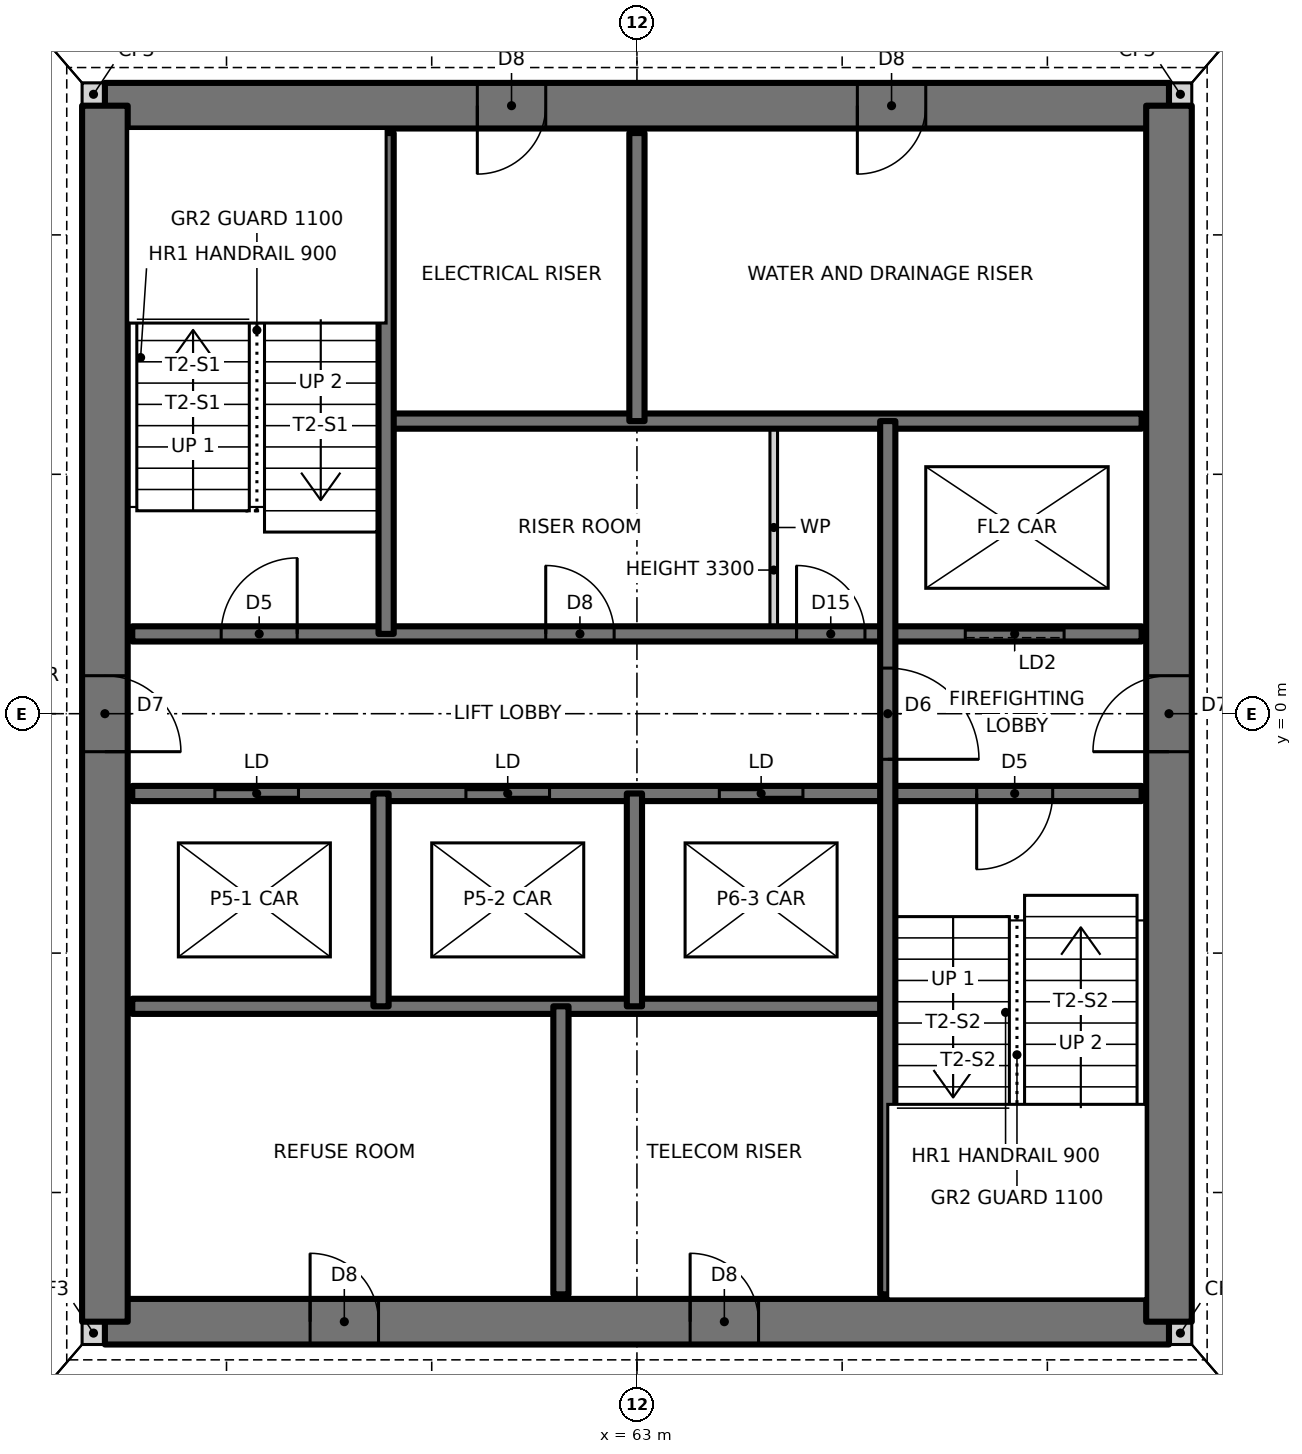
"""IFC4 building model, lengths in metres.
Left out: names, types, materials, properties, quantities, classifications, styles, units other than length and angle.
Written with IfcOpenShell. Run it as: python <this file> out.ifc"""

import sys

from ifc_helpers import new_model, si_unit, direction, frame, frame_2d, origin, place, context, subcontext, project, spatial, rectangle, extrude, element, fill, save


model = new_model("IFC4")
c1 = context("Model", 3, precision=1e-05, world=origin(), true_north=direction((0.0, 1.0)))
c2 = subcontext(c1, "Body", "Model", "MODEL_VIEW")
j1 = project(units=[si_unit("LENGTHUNIT", "METRE"), si_unit("PLANEANGLEUNIT", "RADIAN")], contexts=[c1])
p1 = place(None, origin())
s1 = spatial("IfcSite", under=j1, at=p1, CompositionType="ELEMENT")
p2 = place(p1, origin())
s2 = spatial("IfcBuilding", under=s1, at=p2, CompositionType="ELEMENT")
p3 = place(p2, frame((0.0, 0.0, 29.0)))
s3 = spatial("IfcBuildingStorey", under=s2, at=p3, CompositionType="ELEMENT", Elevation=29.0)
for number, where, z_axis, x_axis in (
    (1, (55.7, -8.15, 0.0), (0.0, 0.0, 1.0), (1.0, 0.0, 0.0)),
    (2, (70.0, -8.15, 0.0), (0.0, 0.0, 1.0), (1.0, 0.0, 0.0)),
    (3, (70.0, 8.15, 0.0), (0.0, 0.0, 1.0), (1.0, 0.0, 0.0)),
    (4, (55.7, 8.15, 0.0), (0.0, 0.0, 1.0), (1.0, 0.0, 0.0)),
):
    element("IfcWall", number, at=place(p3, frame(where, z_axis=z_axis, x_axis=x_axis)), inside=s3, PredefinedType="SOLIDWALL", context=c2, shape_type="SweptSolid", body=[
        extrude(rectangle(XDim=0.3, YDim=0.3, at=frame_2d((0.15, 0.0))), origin(), (0.0, 0.0, 1.0), 3.5),
    ])
p4 = place(p3, frame((56.0, -8.0, 0.0), z_axis=(0.0, 0.0, 1.0), x_axis=(1.0, 0.0, 0.0)))
e5 = element("IfcWall", 5, at=p4, inside=s3, PredefinedType="SHEAR", context=c2, shape_type="SweptSolid", body=[
    extrude(rectangle(XDim=14.0, YDim=0.6, at=frame_2d((7.0, 0.0))), origin(), (0.0, 0.0, 1.0), 3.5),
])
p5 = place(p4, frame((2.7, 0.0, 0.0)))
e6 = element("IfcOpeningElement", 6, at=p5, cuts=e5, PredefinedType="OPENING", context=c2, shape_type="SweptSolid", body=[
    extrude(rectangle(XDim=0.9, YDim=2.1, at=frame_2d((0.45, 1.05))), frame((0.0, 0.31, 0.0), z_axis=(0.0, -1.0, 0.0), x_axis=(1.0, 0.0, 0.0)), (0.0, 0.0, 1.0), 0.62),
])
p6 = place(p4, frame((7.7, 0.0, 0.0)))
e7 = element("IfcOpeningElement", 7, at=p6, cuts=e5, PredefinedType="OPENING", context=c2, shape_type="SweptSolid", body=[
    extrude(rectangle(XDim=0.9, YDim=2.1, at=frame_2d((0.45, 1.05))), frame((0.0, 0.31, 0.0), z_axis=(0.0, -1.0, 0.0), x_axis=(1.0, 0.0, 0.0)), (0.0, 0.0, 1.0), 0.62),
])
p7 = place(p3, frame((70.0, 8.0, 0.0), z_axis=(0.0, 0.0, 1.0), x_axis=(-1.0, 0.0, 0.0)))
e8 = element("IfcWall", 8, at=p7, inside=s3, PredefinedType="SHEAR", context=c2, shape_type="SweptSolid", body=[
    extrude(rectangle(XDim=14.0, YDim=0.6, at=frame_2d((7.0, 0.0))), origin(), (0.0, 0.0, 1.0), 3.5),
])
p8 = place(p7, frame((8.2, 0.0, 0.0)))
e9 = element("IfcOpeningElement", 9, at=p8, cuts=e8, PredefinedType="OPENING", context=c2, shape_type="SweptSolid", body=[
    extrude(rectangle(XDim=0.9, YDim=2.1, at=frame_2d((0.45, 1.05))), frame((0.0, 0.31, 0.0), z_axis=(0.0, -1.0, 0.0), x_axis=(1.0, 0.0, 0.0)), (0.0, 0.0, 1.0), 0.62),
])
p9 = place(p7, frame((3.2, 0.0, 0.0)))
e10 = element("IfcOpeningElement", 10, at=p9, cuts=e8, PredefinedType="OPENING", context=c2, shape_type="SweptSolid", body=[
    extrude(rectangle(XDim=0.9, YDim=2.1, at=frame_2d((0.45, 1.05))), frame((0.0, 0.31, 0.0), z_axis=(0.0, -1.0, 0.0), x_axis=(1.0, 0.0, 0.0)), (0.0, 0.0, 1.0), 0.62),
])
p10 = place(p3, frame((70.0, -8.0, 0.0), z_axis=(0.0, 0.0, 1.0), x_axis=(0.0, 1.0, 0.0)))
e11 = element("IfcWall", 11, at=p10, inside=s3, PredefinedType="SHEAR", context=c2, shape_type="SweptSolid", body=[
    extrude(rectangle(XDim=16.0, YDim=0.6, at=frame_2d((8.0, 0.0))), origin(), (0.0, 0.0, 1.0), 3.5),
])
p11 = place(p10, frame((7.5, 0.0, 0.0)))
e12 = element("IfcOpeningElement", 12, at=p11, cuts=e11, PredefinedType="OPENING", context=c2, shape_type="SweptSolid", body=[
    extrude(rectangle(XDim=1.0, YDim=2.1, at=frame_2d((0.5, 1.05))), frame((0.0, 0.31, 0.0), z_axis=(0.0, -1.0, 0.0), x_axis=(1.0, 0.0, 0.0)), (0.0, 0.0, 1.0), 0.62),
])
p12 = place(p3, frame((56.0, 8.0, 0.0), z_axis=(0.0, 0.0, 1.0), x_axis=(0.0, -1.0, 0.0)))
e13 = element("IfcWall", 13, at=p12, inside=s3, PredefinedType="SHEAR", context=c2, shape_type="SweptSolid", body=[
    extrude(rectangle(XDim=16.0, YDim=0.6, at=frame_2d((8.0, 0.0))), origin(), (0.0, 0.0, 1.0), 3.5),
])
p13 = place(p12, frame((7.5, 0.0, 0.0)))
e14 = element("IfcOpeningElement", 14, at=p13, cuts=e13, PredefinedType="OPENING", context=c2, shape_type="SweptSolid", body=[
    extrude(rectangle(XDim=1.0, YDim=2.1, at=frame_2d((0.5, 1.05))), frame((0.0, 0.31, 0.0), z_axis=(0.0, -1.0, 0.0), x_axis=(1.0, 0.0, 0.0)), (0.0, 0.0, 1.0), 0.62),
])
p14 = place(p3, frame((56.36, -3.85, 0.0), z_axis=(0.0, 0.0, 1.0), x_axis=(1.0, 0.0, 0.0)))
e15 = element("IfcWall", 15, at=p14, inside=s3, PredefinedType="SOLIDWALL", context=c2, shape_type="SweptSolid", body=[
    extrude(rectangle(XDim=9.94, YDim=0.2, at=frame_2d((4.97, 0.0))), origin(), (0.0, 0.0, 1.0), 3.5),
])
p15 = place(p3, frame((56.36, -1.05, 0.0), z_axis=(0.0, 0.0, 1.0), x_axis=(1.0, 0.0, 0.0)))
e16 = element("IfcWall", 16, at=p15, inside=s3, PredefinedType="SOLIDWALL", context=c2, shape_type="SweptSolid", body=[
    extrude(rectangle(XDim=13.28, YDim=0.2, at=frame_2d((6.64, 0.0))), origin(), (0.0, 0.0, 1.0), 3.5),
])
p16 = place(p15, frame((11.11, 0.0, 0.0)))
e17 = element("IfcOpeningElement", 17, at=p16, cuts=e16, PredefinedType="OPENING", context=c2, shape_type="SweptSolid", body=[
    extrude(rectangle(XDim=1.0, YDim=2.1, at=frame_2d((0.5, 1.05))), frame((0.0, 0.11, 0.0), z_axis=(0.0, -1.0, 0.0), x_axis=(1.0, 0.0, 0.0)), (0.0, 0.0, 1.0), 0.22),
])
p17 = place(p15, frame((1.087, 0.0, 0.0)))
e18 = element("IfcOpeningElement", 18, at=p17, cuts=e16, PredefinedType="OPENING", context=c2, shape_type="SweptSolid", body=[
    extrude(rectangle(XDim=1.1, YDim=2.1, at=frame_2d((0.55, 1.05))), frame((0.0, 0.11, 0.0), z_axis=(0.0, -1.0, 0.0), x_axis=(1.0, 0.0, 0.0)), (0.0, 0.0, 1.0), 0.22),
])
p18 = place(p15, frame((4.39, 0.0, 0.0)))
e19 = element("IfcOpeningElement", 19, at=p18, cuts=e16, PredefinedType="OPENING", context=c2, shape_type="SweptSolid", body=[
    extrude(rectangle(XDim=1.1, YDim=2.1, at=frame_2d((0.55, 1.05))), frame((0.0, 0.11, 0.0), z_axis=(0.0, -1.0, 0.0), x_axis=(1.0, 0.0, 0.0)), (0.0, 0.0, 1.0), 0.22),
])
p19 = place(p15, frame((7.724, 0.0, 0.0)))
e20 = element("IfcOpeningElement", 20, at=p19, cuts=e16, PredefinedType="OPENING", context=c2, shape_type="SweptSolid", body=[
    extrude(rectangle(XDim=1.1, YDim=2.1, at=frame_2d((0.55, 1.05))), frame((0.0, 0.11, 0.0), z_axis=(0.0, -1.0, 0.0), x_axis=(1.0, 0.0, 0.0)), (0.0, 0.0, 1.0), 0.22),
])
p20 = place(p3, frame((56.36, 1.05, 0.0), z_axis=(0.0, 0.0, 1.0), x_axis=(1.0, 0.0, 0.0)))
e21 = element("IfcWall", 21, at=p20, inside=s3, PredefinedType="SOLIDWALL", context=c2, shape_type="SweptSolid", body=[
    extrude(rectangle(XDim=13.28, YDim=0.2, at=frame_2d((6.64, 0.0))), origin(), (0.0, 0.0, 1.0), 3.5),
])
p21 = place(p20, frame((1.17, 0.0, 0.0)))
e22 = element("IfcOpeningElement", 22, at=p21, cuts=e21, PredefinedType="OPENING", context=c2, shape_type="SweptSolid", body=[
    extrude(rectangle(XDim=1.0, YDim=2.1, at=frame_2d((0.5, 1.05))), frame((0.0, 0.11, 0.0), z_axis=(0.0, -1.0, 0.0), x_axis=(1.0, 0.0, 0.0)), (0.0, 0.0, 1.0), 0.22),
])
p22 = place(p20, frame((5.44, 0.0, 0.0)))
e23 = element("IfcOpeningElement", 23, at=p22, cuts=e21, PredefinedType="OPENING", context=c2, shape_type="SweptSolid", body=[
    extrude(rectangle(XDim=0.9, YDim=2.1, at=frame_2d((0.45, 1.05))), frame((0.0, 0.11, 0.0), z_axis=(0.0, -1.0, 0.0), x_axis=(1.0, 0.0, 0.0)), (0.0, 0.0, 1.0), 0.22),
])
p23 = place(p20, frame((8.74, 0.0, 0.0)))
e24 = element("IfcOpeningElement", 24, at=p23, cuts=e21, PredefinedType="OPENING", context=c2, shape_type="SweptSolid", body=[
    extrude(rectangle(XDim=0.9, YDim=2.1, at=frame_2d((0.45, 1.05))), frame((0.0, 0.11, 0.0), z_axis=(0.0, -1.0, 0.0), x_axis=(1.0, 0.0, 0.0)), (0.0, 0.0, 1.0), 0.22),
])
p24 = place(p20, frame((10.96, 0.0, 0.0)))
e25 = element("IfcOpeningElement", 25, at=p24, cuts=e21, PredefinedType="OPENING", context=c2, shape_type="SweptSolid", body=[
    extrude(rectangle(XDim=1.3, YDim=2.1, at=frame_2d((0.65, 1.05))), frame((0.0, 0.11, 0.0), z_axis=(0.0, -1.0, 0.0), x_axis=(1.0, 0.0, 0.0)), (0.0, 0.0, 1.0), 0.22),
])
p25 = place(p3, frame((59.7, 3.85, 0.0), z_axis=(0.0, 0.0, 1.0), x_axis=(1.0, 0.0, 0.0)))
e26 = element("IfcWall", 26, at=p25, inside=s3, PredefinedType="SOLIDWALL", context=c2, shape_type="SweptSolid", body=[
    extrude(rectangle(XDim=9.94, YDim=0.2, at=frame_2d((4.97, 0.0))), origin(), (0.0, 0.0, 1.0), 3.5),
])
p26 = place(p3, frame((66.3, -7.64, 0.0), z_axis=(0.0, 0.0, 1.0), x_axis=(0.0, 1.0, 0.0)))
e27 = element("IfcWall", 27, at=p26, inside=s3, PredefinedType="SOLIDWALL", context=c2, shape_type="SweptSolid", body=[
    extrude(rectangle(XDim=11.49, YDim=0.2, at=frame_2d((5.745, 0.0))), origin(), (0.0, 0.0, 1.0), 3.5),
])
p27 = place(p26, frame((7.04, 0.0, 0.0)))
e28 = element("IfcOpeningElement", 28, at=p27, cuts=e27, PredefinedType="OPENING", context=c2, shape_type="SweptSolid", body=[
    extrude(rectangle(XDim=1.2, YDim=2.1, at=frame_2d((0.6, 1.05))), frame((0.0, 0.11, 0.0), z_axis=(0.0, -1.0, 0.0), x_axis=(1.0, 0.0, 0.0)), (0.0, 0.0, 1.0), 0.22),
])
p28 = place(p3, frame((64.8, 1.05, 0.0), z_axis=(0.0, 0.0, 1.0), x_axis=(0.0, 1.0, 0.0)))
e29 = element("IfcWall", 29, at=p28, inside=s3, PredefinedType="PARTITIONING", context=c2, shape_type="SweptSolid", body=[
    extrude(rectangle(XDim=2.8, YDim=0.1, at=frame_2d((1.4, 0.0))), origin(), (0.0, 0.0, 1.0), 3.3),
])
p29 = place(p3, frame((63.0, 3.85, 0.0), z_axis=(0.0, 0.0, 1.0), x_axis=(0.0, 1.0, 0.0)))
e30 = element("IfcWall", 30, at=p29, inside=s3, PredefinedType="SOLIDWALL", context=c2, shape_type="SweptSolid", body=[
    extrude(rectangle(XDim=3.79, YDim=0.2, at=frame_2d((1.895, 0.0))), origin(), (0.0, 0.0, 1.0), 3.5),
])
p30 = place(p3, frame((62.967, -3.85, 0.0), z_axis=(0.0, 0.0, 1.0), x_axis=(0.0, 1.0, 0.0)))
e31 = element("IfcWall", 31, at=p30, inside=s3, PredefinedType="SOLIDWALL", context=c2, shape_type="SweptSolid", body=[
    extrude(rectangle(XDim=2.8, YDim=0.2, at=frame_2d((1.4, 0.0))), origin(), (0.0, 0.0, 1.0), 3.5),
])
p31 = place(p3, frame((62.0, -7.64, 0.0), z_axis=(0.0, 0.0, 1.0), x_axis=(0.0, 1.0, 0.0)))
e32 = element("IfcWall", 32, at=p31, inside=s3, PredefinedType="SOLIDWALL", context=c2, shape_type="SweptSolid", body=[
    extrude(rectangle(XDim=3.79, YDim=0.2, at=frame_2d((1.895, 0.0))), origin(), (0.0, 0.0, 1.0), 3.5),
])
p32 = place(p3, frame((59.7, 1.05, 0.0), z_axis=(0.0, 0.0, 1.0), x_axis=(0.0, 1.0, 0.0)))
e33 = element("IfcWall", 33, at=p32, inside=s3, PredefinedType="SOLIDWALL", context=c2, shape_type="SweptSolid", body=[
    extrude(rectangle(XDim=6.59, YDim=0.2, at=frame_2d((3.295, 0.0))), origin(), (0.0, 0.0, 1.0), 3.5),
])
p33 = place(p3, frame((59.633, -3.85, 0.0), z_axis=(0.0, 0.0, 1.0), x_axis=(0.0, 1.0, 0.0)))
e34 = element("IfcWall", 34, at=p33, inside=s3, PredefinedType="SOLIDWALL", context=c2, shape_type="SweptSolid", body=[
    extrude(rectangle(XDim=2.8, YDim=0.2, at=frame_2d((1.4, 0.0))), origin(), (0.0, 0.0, 1.0), 3.5),
])
p34 = place(p21, origin())
e35 = element("IfcDoor", 35, at=p34, inside=s3, OperationType="SINGLE_SWING_RIGHT", PredefinedType="DOOR", context=c2, shape_type="SweptSolid", body=[
    extrude(rectangle(XDim=1.0, YDim=2.1, at=frame_2d((0.5, 1.05))), frame((0.0, 0.025, 0.0), z_axis=(0.0, -1.0, 0.0), x_axis=(1.0, 0.0, 0.0)), (0.0, 0.0, 1.0), 0.05),
])
fill(e22, e35)
p35 = place(p16, frame((1.0, 0.0, 0.0), z_axis=(0.0, 0.0, 1.0), x_axis=(-1.0, 0.0, 0.0)))
e36 = element("IfcDoor", 36, at=p35, inside=s3, OperationType="SINGLE_SWING_RIGHT", PredefinedType="DOOR", context=c2, shape_type="SweptSolid", body=[
    extrude(rectangle(XDim=1.0, YDim=2.1, at=frame_2d((0.5, 1.05))), frame((0.0, 0.025, 0.0), z_axis=(0.0, -1.0, 0.0), x_axis=(1.0, 0.0, 0.0)), (0.0, 0.0, 1.0), 0.05),
])
fill(e17, e36)
p36 = place(p27, frame((1.2, 0.0, 0.0), z_axis=(0.0, 0.0, 1.0), x_axis=(-1.0, 0.0, 0.0)))
e37 = element("IfcDoor", 37, at=p36, inside=s3, OperationType="SINGLE_SWING_RIGHT", PredefinedType="DOOR", context=c2, shape_type="SweptSolid", body=[
    extrude(rectangle(XDim=1.2, YDim=2.1, at=frame_2d((0.6, 1.05))), frame((0.0, 0.025, 0.0), z_axis=(0.0, -1.0, 0.0), x_axis=(1.0, 0.0, 0.0)), (0.0, 0.0, 1.0), 0.05),
])
fill(e28, e37)
p37 = place(p22, origin())
e38 = element("IfcDoor", 38, at=p37, inside=s3, OperationType="SINGLE_SWING_LEFT", PredefinedType="DOOR", context=c2, shape_type="SweptSolid", body=[
    extrude(rectangle(XDim=0.9, YDim=2.1, at=frame_2d((0.45, 1.05))), frame((0.0, 0.025, 0.0), z_axis=(0.0, -1.0, 0.0), x_axis=(1.0, 0.0, 0.0)), (0.0, 0.0, 1.0), 0.05),
])
fill(e23, e38)
p38 = place(p23, origin())
e39 = element("IfcDoor", 39, at=p38, inside=s3, OperationType="SINGLE_SWING_LEFT", PredefinedType="DOOR", context=c2, shape_type="SweptSolid", body=[
    extrude(rectangle(XDim=0.9, YDim=2.1, at=frame_2d((0.45, 1.05))), frame((0.0, 0.025, 0.0), z_axis=(0.0, -1.0, 0.0), x_axis=(1.0, 0.0, 0.0)), (0.0, 0.0, 1.0), 0.05),
])
fill(e24, e39)
p39 = place(p13, origin())
e40 = element("IfcDoor", 40, at=p39, inside=s3, OperationType="SINGLE_SWING_RIGHT", PredefinedType="DOOR", context=c2, shape_type="SweptSolid", body=[
    extrude(rectangle(XDim=1.0, YDim=2.1, at=frame_2d((0.5, 1.05))), frame((0.0, 0.025, 0.0), z_axis=(0.0, -1.0, 0.0), x_axis=(1.0, 0.0, 0.0)), (0.0, 0.0, 1.0), 0.05),
])
fill(e14, e40)
p40 = place(p11, origin())
e41 = element("IfcDoor", 41, at=p40, inside=s3, OperationType="SINGLE_SWING_LEFT", PredefinedType="DOOR", context=c2, shape_type="SweptSolid", body=[
    extrude(rectangle(XDim=1.0, YDim=2.1, at=frame_2d((0.5, 1.05))), frame((0.0, 0.025, 0.0), z_axis=(0.0, -1.0, 0.0), x_axis=(1.0, 0.0, 0.0)), (0.0, 0.0, 1.0), 0.05),
])
fill(e12, e41)
p41 = place(p8, origin())
e42 = element("IfcDoor", 42, at=p41, inside=s3, OperationType="SINGLE_SWING_RIGHT", PredefinedType="DOOR", context=c2, shape_type="SweptSolid", body=[
    extrude(rectangle(XDim=0.9, YDim=2.1, at=frame_2d((0.45, 1.05))), frame((0.0, 0.025, 0.0), z_axis=(0.0, -1.0, 0.0), x_axis=(1.0, 0.0, 0.0)), (0.0, 0.0, 1.0), 0.05),
])
fill(e9, e42)
p42 = place(p9, origin())
e43 = element("IfcDoor", 43, at=p42, inside=s3, OperationType="SINGLE_SWING_RIGHT", PredefinedType="DOOR", context=c2, shape_type="SweptSolid", body=[
    extrude(rectangle(XDim=0.9, YDim=2.1, at=frame_2d((0.45, 1.05))), frame((0.0, 0.025, 0.0), z_axis=(0.0, -1.0, 0.0), x_axis=(1.0, 0.0, 0.0)), (0.0, 0.0, 1.0), 0.05),
])
fill(e10, e43)
p43 = place(p5, origin())
e44 = element("IfcDoor", 44, at=p43, inside=s3, OperationType="SINGLE_SWING_LEFT", PredefinedType="DOOR", context=c2, shape_type="SweptSolid", body=[
    extrude(rectangle(XDim=0.9, YDim=2.1, at=frame_2d((0.45, 1.05))), frame((0.0, 0.025, 0.0), z_axis=(0.0, -1.0, 0.0), x_axis=(1.0, 0.0, 0.0)), (0.0, 0.0, 1.0), 0.05),
])
fill(e6, e44)
p44 = place(p6, origin())
e45 = element("IfcDoor", 45, at=p44, inside=s3, OperationType="SINGLE_SWING_LEFT", PredefinedType="DOOR", context=c2, shape_type="SweptSolid", body=[
    extrude(rectangle(XDim=0.9, YDim=2.1, at=frame_2d((0.45, 1.05))), frame((0.0, 0.025, 0.0), z_axis=(0.0, -1.0, 0.0), x_axis=(1.0, 0.0, 0.0)), (0.0, 0.0, 1.0), 0.05),
])
fill(e7, e45)
p45 = place(p17, origin())
e46 = element("IfcDoor", 46, at=p45, inside=s3, OperationType="DOUBLE_DOOR_SLIDING", PredefinedType="DOOR", context=c2, shape_type="SweptSolid", body=[
    extrude(rectangle(XDim=1.1, YDim=2.1, at=frame_2d((0.55, 1.05))), frame((0.0, 0.025, 0.0), z_axis=(0.0, -1.0, 0.0), x_axis=(1.0, 0.0, 0.0)), (0.0, 0.0, 1.0), 0.05),
])
fill(e18, e46)
p46 = place(p18, origin())
e47 = element("IfcDoor", 47, at=p46, inside=s3, OperationType="DOUBLE_DOOR_SLIDING", PredefinedType="DOOR", context=c2, shape_type="SweptSolid", body=[
    extrude(rectangle(XDim=1.1, YDim=2.1, at=frame_2d((0.55, 1.05))), frame((0.0, 0.025, 0.0), z_axis=(0.0, -1.0, 0.0), x_axis=(1.0, 0.0, 0.0)), (0.0, 0.0, 1.0), 0.05),
])
fill(e19, e47)
p47 = place(p19, origin())
e48 = element("IfcDoor", 48, at=p47, inside=s3, OperationType="DOUBLE_DOOR_SLIDING", PredefinedType="DOOR", context=c2, shape_type="SweptSolid", body=[
    extrude(rectangle(XDim=1.1, YDim=2.1, at=frame_2d((0.55, 1.05))), frame((0.0, 0.025, 0.0), z_axis=(0.0, -1.0, 0.0), x_axis=(1.0, 0.0, 0.0)), (0.0, 0.0, 1.0), 0.05),
])
fill(e20, e48)
p48 = place(p24, origin())
e49 = element("IfcDoor", 49, at=p48, inside=s3, OperationType="SLIDING_TO_LEFT", PredefinedType="DOOR", context=c2, shape_type="SweptSolid", body=[
    extrude(rectangle(XDim=1.3, YDim=2.1, at=frame_2d((0.65, 1.05))), frame((0.0, 0.025, 0.0), z_axis=(0.0, -1.0, 0.0), x_axis=(1.0, 0.0, 0.0)), (0.0, 0.0, 1.0), 0.05),
])
fill(e25, e49)
save(model, sys.argv[1])
